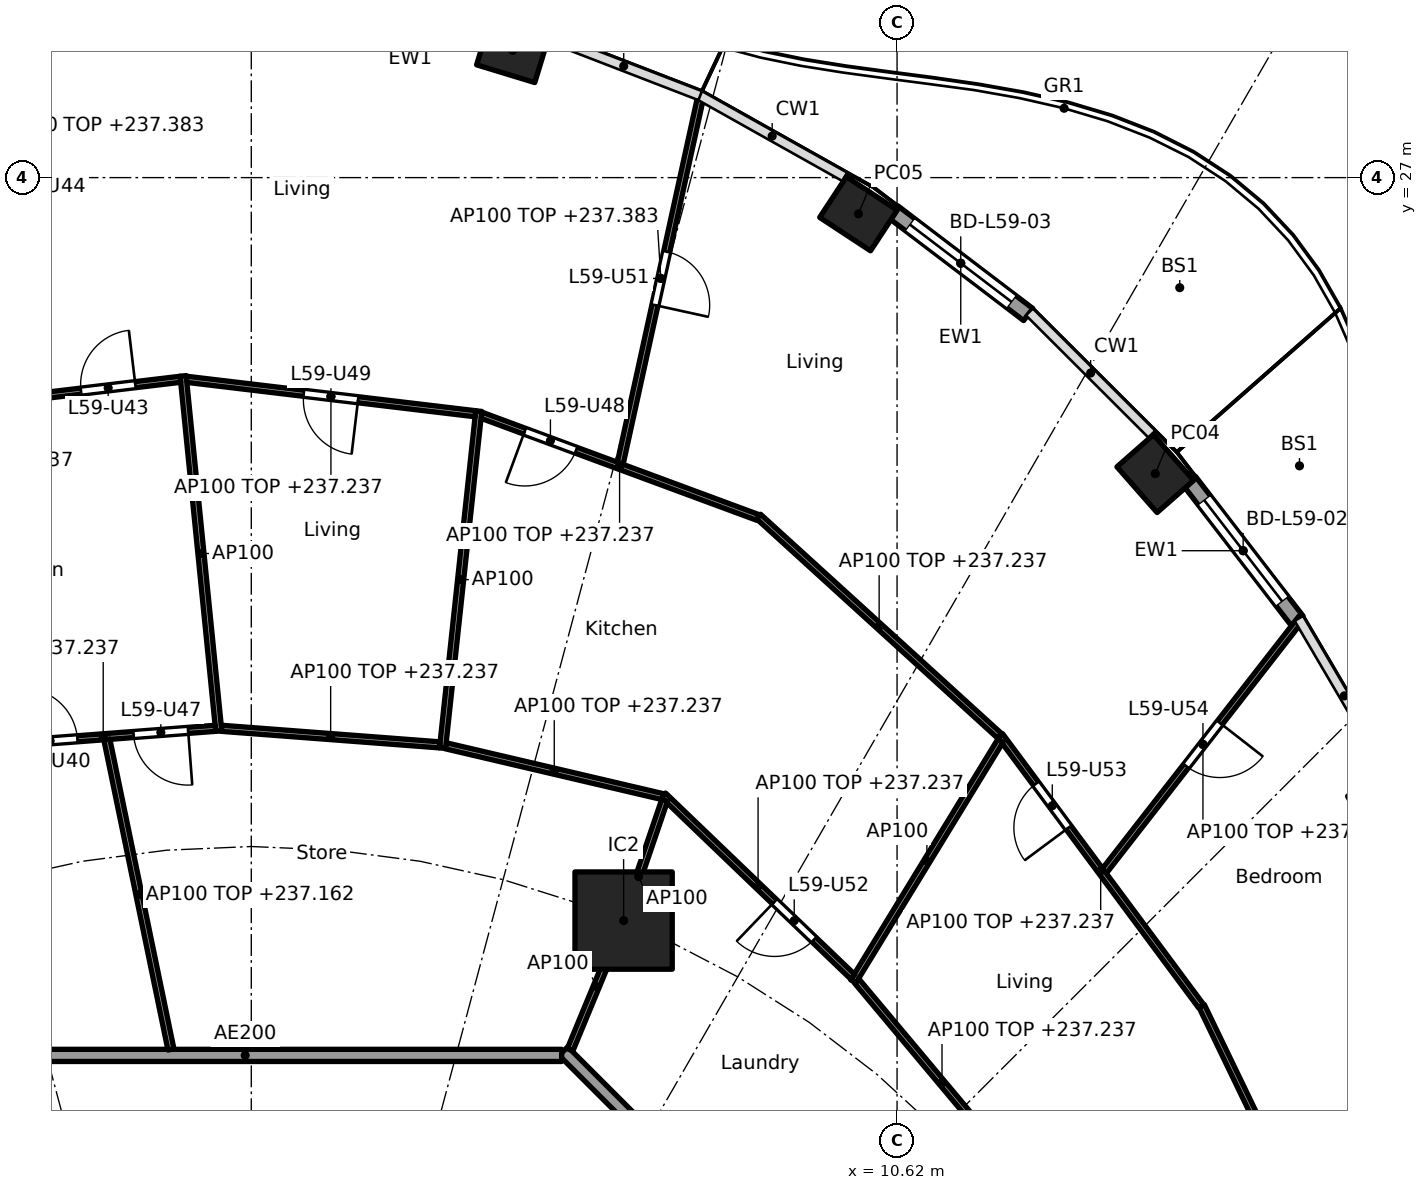
"""IFC4 building model, lengths in metres.
Left out: names, types, materials, properties, quantities, classifications, styles, units other than length and angle.
Written with IfcOpenShell. Run it as: python <this file> out.ifc"""

import sys

from ifc_helpers import new_model, si_unit, direction, frame, frame_2d, origin, origin_2d, place, context, subcontext, project, spatial, rectangle, hollow_rectangle, extrude, element, fill, save


model = new_model("IFC4")
c1 = context("Model", 3, precision=1e-05, world=origin(), true_north=direction((0.0, 1.0)))
c2 = subcontext(c1, "Body", "Model", "MODEL_VIEW")
j1 = project(units=[si_unit("LENGTHUNIT", "METRE"), si_unit("PLANEANGLEUNIT", "RADIAN")], contexts=[c1])
p1 = place(None, origin())
s1 = spatial("IfcSite", under=j1, at=p1, CompositionType="ELEMENT")
p2 = place(p1, origin())
s2 = spatial("IfcBuilding", under=s1, at=p2, CompositionType="ELEMENT")
p3 = place(p2, frame((0.0, 0.0, 234.4)))
s3 = spatial("IfcBuildingStorey", under=s2, at=p3, CompositionType="ELEMENT", Elevation=234.4)
for number, where, z_axis, x_axis in (
    (1, (18.612, 16.563, 0.0), (0.0, 0.0, 1.0), (-0.452, 0.892, 0.0)),
    (2, (14.866, 22.132, 0.0), (0.0, 0.0, 1.0), (-0.66, 0.751, 0.0)),
    (3, (9.985, 26.405, 0.0), (0.0, 0.0, 1.0), (-0.836, 0.549, 0.0)),
    (4, (4.3, 29.092, 0.0), (0.0, 0.0, 1.0), (-0.957, 0.292, 0.0)),
):
    element("IfcColumn", number, at=place(p3, frame(where, z_axis=z_axis, x_axis=x_axis)), inside=s3, PredefinedType="COLUMN", context=c2, shape_type="SweptSolid", body=[
        extrude(hollow_rectangle(XDim=1.0, YDim=0.8, WallThickness=0.032, at=origin_2d()), origin(), (0.0, 0.0, 1.0), 3.7),
    ])
p4 = place(p3, frame((6.123, 14.782, 0.0), z_axis=(0.0, 0.0, 1.0), x_axis=(1.0, 0.0, 0.0)))
e5 = element("IfcColumn", 5, at=p4, inside=s3, PredefinedType="COLUMN", context=c2, shape_type="SweptSolid", body=[
    extrude(rectangle(XDim=1.6, YDim=1.6, at=origin_2d()), origin(), (0.0, 0.0, 1.0), 3.7),
])
p5 = place(p3, frame((15.426, 22.013, 0.0), z_axis=(0.0, 0.0, 1.0), x_axis=(0.610438565676, -0.792063607001, 0.0)))
e6 = element("IfcWall", 6, at=p5, inside=s3, PredefinedType="SOLIDWALL", context=c2, shape_type="SweptSolid", body=[
    extrude(rectangle(XDim=2.901, YDim=0.25, at=frame_2d((1.45, 0.0))), origin(), (0.0, 0.0, 1.0), 3.44),
])
p6 = place(p5, frame((0.4, 0.0, 0.0)))
e7 = element("IfcOpeningElement", 7, at=p6, cuts=e6, PredefinedType="OPENING", context=c2, shape_type="SweptSolid", body=[
    extrude(rectangle(XDim=2.1, YDim=2.4, at=frame_2d((1.05, 1.2))), frame((0.0, 0.135, 0.0), z_axis=(0.0, -1.0, 0.0), x_axis=(1.0, 0.0, 0.0)), (0.0, 0.0, 1.0), 0.27),
])
p7 = place(p3, frame((10.557, 26.436, 0.0), z_axis=(0.0, 0.0, 1.0), x_axis=(0.796022158395, -0.605267480825, 0.0)))
e8 = element("IfcWall", 8, at=p7, inside=s3, PredefinedType="SOLIDWALL", context=c2, shape_type="SweptSolid", body=[
    extrude(rectangle(XDim=2.789, YDim=0.25, at=frame_2d((1.395, 0.0))), origin(), (0.0, 0.0, 1.0), 3.44),
])
p8 = place(p7, frame((0.344, 0.0, 0.0)))
e9 = element("IfcOpeningElement", 9, at=p8, cuts=e8, PredefinedType="OPENING", context=c2, shape_type="SweptSolid", body=[
    extrude(rectangle(XDim=2.1, YDim=2.4, at=frame_2d((1.05, 1.2))), frame((0.0, 0.135, 0.0), z_axis=(0.0, -1.0, 0.0), x_axis=(1.0, 0.0, 0.0)), (0.0, 0.0, 1.0), 0.27),
])
p9 = place(p3, frame((12.635, 5.134, 0.0), z_axis=(0.0, 0.0, 1.0), x_axis=(-0.707106781187, 0.707106781187, 0.0)))
e10 = element("IfcWall", 10, at=p9, inside=s3, PredefinedType="PARTITIONING", context=c2, shape_type="SweptSolid", body=[
    extrude(rectangle(XDim=10.609, YDim=0.2, at=frame_2d((5.305, 0.0))), origin(), (0.0, 0.0, 1.0), 3.44),
])
p10 = place(p3, frame((5.104, 12.565, 0.0), z_axis=(0.0, 0.0, 1.0), x_axis=(-1.0, 0.0, 0.0)))
e11 = element("IfcWall", 11, at=p10, inside=s3, PredefinedType="PARTITIONING", context=c2, shape_type="SweptSolid", body=[
    extrude(rectangle(XDim=10.409, YDim=0.2, at=frame_2d((5.205, 0.0))), origin(), (0.0, 0.0, 1.0), 3.44),
])
p11 = place(p3, frame((18.095, 8.269, 0.0), z_axis=(0.0, 0.0, 1.0), x_axis=(-0.434640773561, 0.900603907363, 0.0)))
e12 = element("IfcWall", 12, at=p11, inside=s3, PredefinedType="PARTITIONING", context=c2, shape_type="SweptSolid", body=[
    extrude(rectangle(XDim=5.674, YDim=0.1, at=frame_2d((2.837, 0.0))), origin(), (0.0, 0.0, 1.0), 2.837),
])
p12 = place(p3, frame((12.759, 10.443, 0.0), z_axis=(0.0, 0.0, 1.0), x_axis=(-0.642225196965, 0.766516011825, 0.0)))
e13 = element("IfcWall", 13, at=p12, inside=s3, PredefinedType="PARTITIONING", context=c2, shape_type="SweptSolid", body=[
    extrude(rectangle(XDim=4.361, YDim=0.1, at=frame_2d((2.18, 0.0))), origin(), (0.0, 0.0, 1.0), 2.837),
])
p13 = place(p3, frame((15.621, 13.374, 0.0), z_axis=(0.0, 0.0, 1.0), x_axis=(-0.596165830899, 0.802861321816, 0.0)))
e14 = element("IfcWall", 14, at=p13, inside=s3, PredefinedType="PARTITIONING", context=c2, shape_type="SweptSolid", body=[
    extrude(rectangle(XDim=5.542, YDim=0.1, at=frame_2d((2.771, 0.0))), origin(), (0.0, 0.0, 1.0), 2.837),
])
p14 = place(p13, frame((3.656, 0.0, 0.0)))
e15 = element("IfcOpeningElement", 15, at=p14, cuts=e14, PredefinedType="OPENING", context=c2, shape_type="SweptSolid", body=[
    extrude(rectangle(XDim=0.9, YDim=2.1, at=frame_2d((0.45, 1.05))), frame((0.0, 0.06, 0.0), z_axis=(0.0, -1.0, 0.0), x_axis=(1.0, 0.0, 0.0)), (0.0, 0.0, 1.0), 0.12),
])
p15 = place(p3, frame((14.029, 15.598, 0.0), z_axis=(0.0, 0.0, 1.0), x_axis=(0.614558710688, 0.788871086501, 0.0)))
e16 = element("IfcWall", 16, at=p15, inside=s3, PredefinedType="PARTITIONING", context=c2, shape_type="SweptSolid", body=[
    extrude(rectangle(XDim=5.276, YDim=0.1, at=frame_2d((2.638, 0.0))), origin(), (0.0, 0.0, 1.0), 2.983),
])
p16 = place(p15, frame((2.188, 0.0, 0.0)))
e17 = element("IfcOpeningElement", 17, at=p16, cuts=e16, PredefinedType="OPENING", context=c2, shape_type="SweptSolid", body=[
    extrude(rectangle(XDim=0.9, YDim=2.1, at=frame_2d((0.45, 1.05))), frame((0.0, 0.06, 0.0), z_axis=(0.0, -1.0, 0.0), x_axis=(1.0, 0.0, 0.0)), (0.0, 0.0, 1.0), 0.12),
])
p17 = place(p3, frame((9.9, 13.781, 0.0), z_axis=(0.0, 0.0, 1.0), x_axis=(0.521464905534, 0.853272730313, 0.0)))
e18 = element("IfcWall", 18, at=p17, inside=s3, PredefinedType="PARTITIONING", context=c2, shape_type="SweptSolid", body=[
    extrude(rectangle(XDim=4.641, YDim=0.1, at=frame_2d((2.32, 0.0))), origin(), (0.0, 0.0, 1.0), 3.44),
])
p18 = place(p3, frame((9.89, 13.858, 0.0), z_axis=(0.0, 0.0, 1.0), x_axis=(-0.72167233993, 0.692234811159, 0.0)))
e19 = element("IfcWall", 19, at=p18, inside=s3, PredefinedType="PARTITIONING", context=c2, shape_type="SweptSolid", body=[
    extrude(rectangle(XDim=4.313, YDim=0.1, at=frame_2d((2.156, 0.0))), origin(), (0.0, 0.0, 1.0), 2.837),
])
p19 = place(p18, frame((0.883, 0.0, 0.0)))
e20 = element("IfcOpeningElement", 20, at=p19, cuts=e19, PredefinedType="OPENING", context=c2, shape_type="SweptSolid", body=[
    extrude(rectangle(XDim=0.9, YDim=2.1, at=frame_2d((0.45, 1.05))), frame((0.0, 0.06, 0.0), z_axis=(0.0, -1.0, 0.0), x_axis=(1.0, 0.0, 0.0)), (0.0, 0.0, 1.0), 0.12),
])
p20 = place(p3, frame((12.31, 17.817, 0.0), z_axis=(0.0, 0.0, 1.0), x_axis=(-0.739697052892, 0.672940019573, 0.0)))
e21 = element("IfcWall", 21, at=p20, inside=s3, PredefinedType="PARTITIONING", context=c2, shape_type="SweptSolid", body=[
    extrude(rectangle(XDim=5.365, YDim=0.1, at=frame_2d((2.683, 0.0))), origin(), (0.0, 0.0, 1.0), 2.837),
])
p21 = place(p3, frame((5.243, 12.657, 0.0), z_axis=(0.0, 0.0, 1.0), x_axis=(0.382719158442, 0.923864733477, 0.0)))
e22 = element("IfcWall", 22, at=p21, inside=s3, PredefinedType="PARTITIONING", context=c2, shape_type="SweptSolid", body=[
    extrude(rectangle(XDim=2.25, YDim=0.1, at=frame_2d((1.125, 0.0))), origin(), (0.0, 0.0, 1.0), 3.44),
])
p22 = place(p3, frame((6.139, 14.829, 0.0), z_axis=(0.0, 0.0, 1.0), x_axis=(0.32278593828, 0.946471995385, 0.0)))
e23 = element("IfcWall", 23, at=p22, inside=s3, PredefinedType="PARTITIONING", context=c2, shape_type="SweptSolid", body=[
    extrude(rectangle(XDim=2.042, YDim=0.1, at=frame_2d((1.021, 0.0))), origin(), (0.0, 0.0, 1.0), 3.44),
])
p23 = place(p3, frame((6.766, 16.82, 0.0), z_axis=(0.0, 0.0, 1.0), x_axis=(-0.973612608559, 0.22820711745, 0.0)))
e24 = element("IfcWall", 24, at=p23, inside=s3, PredefinedType="PARTITIONING", context=c2, shape_type="SweptSolid", body=[
    extrude(rectangle(XDim=3.663, YDim=0.1, at=frame_2d((1.832, 0.0))), origin(), (0.0, 0.0, 1.0), 2.837),
])
p24 = place(p3, frame((8.331, 21.411, 0.0), z_axis=(0.0, 0.0, 1.0), x_axis=(-0.937891982431, 0.346927412136, 0.0)))
e25 = element("IfcWall", 25, at=p24, inside=s3, PredefinedType="PARTITIONING", context=c2, shape_type="SweptSolid", body=[
    extrude(rectangle(XDim=4.85, YDim=0.1, at=frame_2d((2.425, 0.0))), origin(), (0.0, 0.0, 1.0), 2.837),
])
p25 = place(p24, frame((3.188, 0.0, 0.0)))
e26 = element("IfcOpeningElement", 26, at=p25, cuts=e25, PredefinedType="OPENING", context=c2, shape_type="SweptSolid", body=[
    extrude(rectangle(XDim=0.9, YDim=2.1, at=frame_2d((0.45, 1.05))), frame((0.0, 0.06, 0.0), z_axis=(0.0, -1.0, 0.0), x_axis=(1.0, 0.0, 0.0)), (0.0, 0.0, 1.0), 0.12),
])
p26 = place(p3, frame((6.067, 22.301, 0.0), z_axis=(0.0, 0.0, 1.0), x_axis=(0.214401821533, 0.976745544614, 0.0)))
e27 = element("IfcWall", 27, at=p26, inside=s3, PredefinedType="PARTITIONING", context=c2, shape_type="SweptSolid", body=[
    extrude(rectangle(XDim=6.228, YDim=0.1, at=frame_2d((3.114, 0.0))), origin(), (0.0, 0.0, 1.0), 2.983),
])
p27 = place(p26, frame((2.664, 0.0, 0.0)))
e28 = element("IfcOpeningElement", 28, at=p27, cuts=e27, PredefinedType="OPENING", context=c2, shape_type="SweptSolid", body=[
    extrude(rectangle(XDim=0.9, YDim=2.1, at=frame_2d((0.45, 1.05))), frame((0.0, 0.06, 0.0), z_axis=(0.0, -1.0, 0.0), x_axis=(1.0, 0.0, 0.0)), (0.0, 0.0, 1.0), 0.12),
])
p28 = place(p3, frame((3.145, 17.618, 0.0), z_axis=(0.0, 0.0, 1.0), x_axis=(0.106820754108, 0.994278294288, 0.0)))
e29 = element("IfcWall", 29, at=p28, inside=s3, PredefinedType="PARTITIONING", context=c2, shape_type="SweptSolid", body=[
    extrude(rectangle(XDim=5.574, YDim=0.1, at=frame_2d((2.787, 0.0))), origin(), (0.0, 0.0, 1.0), 3.44),
])
p29 = place(p3, frame((3.101, 17.671, 0.0), z_axis=(0.0, 0.0, 1.0), x_axis=(-0.997133705575, 0.075659587668, 0.0)))
e30 = element("IfcWall", 30, at=p29, inside=s3, PredefinedType="PARTITIONING", context=c2, shape_type="SweptSolid", body=[
    extrude(rectangle(XDim=3.601, YDim=0.1, at=frame_2d((1.801, 0.0))), origin(), (0.0, 0.0, 1.0), 2.837),
])
p30 = place(p3, frame((3.686, 23.117, 0.0), z_axis=(0.0, 0.0, 1.0), x_axis=(-0.992965872314, 0.11840091393, 0.0)))
e31 = element("IfcWall", 31, at=p30, inside=s3, PredefinedType="PARTITIONING", context=c2, shape_type="SweptSolid", body=[
    extrude(rectangle(XDim=4.786, YDim=0.1, at=frame_2d((2.393, 0.0))), origin(), (0.0, 0.0, 1.0), 2.837),
])
p31 = place(p30, frame((1.943, 0.0, 0.0)))
e32 = element("IfcOpeningElement", 32, at=p31, cuts=e31, PredefinedType="OPENING", context=c2, shape_type="SweptSolid", body=[
    extrude(rectangle(XDim=0.9, YDim=2.1, at=frame_2d((0.45, 1.05))), frame((0.0, 0.06, 0.0), z_axis=(0.0, -1.0, 0.0), x_axis=(1.0, 0.0, 0.0)), (0.0, 0.0, 1.0), 0.12),
])
p32 = place(p3, frame((-0.535, 17.898, 0.0), z_axis=(0.0, 0.0, 1.0), x_axis=(-0.099853714131, 0.995002128527, 0.0)))
e33 = element("IfcWall", 33, at=p32, inside=s3, PredefinedType="PARTITIONING", context=c2, shape_type="SweptSolid", body=[
    extrude(rectangle(XDim=5.87, YDim=0.1, at=frame_2d((2.935, 0.0))), origin(), (0.0, 0.0, 1.0), 3.44),
])
p33 = place(p3, frame((-0.59, 17.944, 0.0), z_axis=(0.0, 0.0, 1.0), x_axis=(-0.997133495787, -0.075662352452, 0.0)))
e34 = element("IfcWall", 34, at=p33, inside=s3, PredefinedType="PARTITIONING", context=c2, shape_type="SweptSolid", body=[
    extrude(rectangle(XDim=3.701, YDim=0.1, at=frame_2d((1.851, 0.0))), origin(), (0.0, 0.0, 1.0), 2.837),
])
p34 = place(p33, frame((2.276, 0.0, 0.0)))
e35 = element("IfcOpeningElement", 35, at=p34, cuts=e34, PredefinedType="OPENING", context=c2, shape_type="SweptSolid", body=[
    extrude(rectangle(XDim=0.9, YDim=2.1, at=frame_2d((0.45, 1.05))), frame((0.0, 0.06, 0.0), z_axis=(0.0, -1.0, 0.0), x_axis=(1.0, 0.0, 0.0)), (0.0, 0.0, 1.0), 0.12),
])
p35 = place(p33, frame((0.45, 0.0, 0.0)))
e36 = element("IfcOpeningElement", 36, at=p35, cuts=e34, PredefinedType="OPENING", context=c2, shape_type="SweptSolid", body=[
    extrude(rectangle(XDim=0.9, YDim=2.1, at=frame_2d((0.45, 1.05))), frame((0.0, 0.06, 0.0), z_axis=(0.0, -1.0, 0.0), x_axis=(1.0, 0.0, 0.0)), (0.0, 0.0, 1.0), 0.12),
])
p36 = place(p3, frame((-1.166, 23.683, 0.0), z_axis=(0.0, 0.0, 1.0), x_axis=(-0.992961712415, -0.118435795593, 0.0)))
e37 = element("IfcWall", 37, at=p36, inside=s3, PredefinedType="PARTITIONING", context=c2, shape_type="SweptSolid", body=[
    extrude(rectangle(XDim=4.885, YDim=0.1, at=frame_2d((2.443, 0.0))), origin(), (0.0, 0.0, 1.0), 2.837),
])
p37 = place(p36, frame((0.746, 0.0, 0.0)))
e38 = element("IfcOpeningElement", 38, at=p37, cuts=e37, PredefinedType="OPENING", context=c2, shape_type="SweptSolid", body=[
    extrude(rectangle(XDim=0.9, YDim=2.1, at=frame_2d((0.45, 1.05))), frame((0.0, 0.06, 0.0), z_axis=(0.0, -1.0, 0.0), x_axis=(1.0, 0.0, 0.0)), (0.0, 0.0, 1.0), 0.12),
])
p38 = place(p3, frame((-1.321, 12.663, 0.0), z_axis=(0.0, 0.0, 1.0), x_axis=(-0.202526486639, 0.979276785291, 0.0)))
e39 = element("IfcWall", 39, at=p38, inside=s3, PredefinedType="PARTITIONING", context=c2, shape_type="SweptSolid", body=[
    extrude(rectangle(XDim=5.204, YDim=0.1, at=frame_2d((2.602, 0.0))), origin(), (0.0, 0.0, 1.0), 2.762),
])
p39 = place(p6, origin())
e40 = element("IfcDoor", 40, at=p39, inside=s3, OperationType="SLIDING_TO_LEFT", PredefinedType="DOOR", context=c2, shape_type="SweptSolid", body=[
    extrude(rectangle(XDim=2.1, YDim=2.4, at=frame_2d((1.05, 1.2))), frame((0.0, 0.025, 0.0), z_axis=(0.0, -1.0, 0.0), x_axis=(1.0, 0.0, 0.0)), (0.0, 0.0, 1.0), 0.05),
])
fill(e7, e40)
p40 = place(p8, origin())
e41 = element("IfcDoor", 41, at=p40, inside=s3, OperationType="SLIDING_TO_LEFT", PredefinedType="DOOR", context=c2, shape_type="SweptSolid", body=[
    extrude(rectangle(XDim=2.1, YDim=2.4, at=frame_2d((1.05, 1.2))), frame((0.0, 0.025, 0.0), z_axis=(0.0, -1.0, 0.0), x_axis=(1.0, 0.0, 0.0)), (0.0, 0.0, 1.0), 0.05),
])
fill(e9, e41)
p41 = place(p34, frame((0.9, 0.0, 0.0), x_axis=(-1.0, 0.0, 0.0)))
e42 = element("IfcDoor", 42, at=p41, inside=s3, OperationType="SINGLE_SWING_LEFT", PredefinedType="DOOR", context=c2, shape_type="SweptSolid", body=[
    extrude(rectangle(XDim=0.9, YDim=2.1, at=frame_2d((0.45, 1.05))), frame((0.0, 0.025, 0.0), z_axis=(0.0, -1.0, 0.0), x_axis=(1.0, 0.0, 0.0)), (0.0, 0.0, 1.0), 0.05),
])
fill(e35, e42)
p42 = place(p37, frame((0.9, 0.0, 0.0), x_axis=(-1.0, 0.0, 0.0)))
e43 = element("IfcDoor", 43, at=p42, inside=s3, OperationType="SINGLE_SWING_RIGHT", PredefinedType="DOOR", context=c2, shape_type="SweptSolid", body=[
    extrude(rectangle(XDim=0.9, YDim=2.1, at=frame_2d((0.45, 1.05))), frame((0.0, 0.025, 0.0), z_axis=(0.0, -1.0, 0.0), x_axis=(1.0, 0.0, 0.0)), (0.0, 0.0, 1.0), 0.05),
])
fill(e38, e43)
p43 = place(p35, origin())
e44 = element("IfcDoor", 44, at=p43, inside=s3, OperationType="SINGLE_SWING_LEFT", PredefinedType="DOOR", context=c2, shape_type="SweptSolid", body=[
    extrude(rectangle(XDim=0.9, YDim=2.1, at=frame_2d((0.45, 1.05))), frame((0.0, 0.025, 0.0), z_axis=(0.0, -1.0, 0.0), x_axis=(1.0, 0.0, 0.0)), (0.0, 0.0, 1.0), 0.05),
])
fill(e36, e44)
p44 = place(p25, origin())
e45 = element("IfcDoor", 45, at=p44, inside=s3, OperationType="SINGLE_SWING_RIGHT", PredefinedType="DOOR", context=c2, shape_type="SweptSolid", body=[
    extrude(rectangle(XDim=0.9, YDim=2.1, at=frame_2d((0.45, 1.05))), frame((0.0, 0.025, 0.0), z_axis=(0.0, -1.0, 0.0), x_axis=(1.0, 0.0, 0.0)), (0.0, 0.0, 1.0), 0.05),
])
fill(e26, e45)
p45 = place(p31, origin())
e46 = element("IfcDoor", 46, at=p45, inside=s3, OperationType="SINGLE_SWING_LEFT", PredefinedType="DOOR", context=c2, shape_type="SweptSolid", body=[
    extrude(rectangle(XDim=0.9, YDim=2.1, at=frame_2d((0.45, 1.05))), frame((0.0, 0.025, 0.0), z_axis=(0.0, -1.0, 0.0), x_axis=(1.0, 0.0, 0.0)), (0.0, 0.0, 1.0), 0.05),
])
fill(e32, e46)
p46 = place(p27, frame((0.9, 0.0, 0.0), x_axis=(-1.0, 0.0, 0.0)))
e47 = element("IfcDoor", 47, at=p46, inside=s3, OperationType="SINGLE_SWING_RIGHT", PredefinedType="DOOR", context=c2, shape_type="SweptSolid", body=[
    extrude(rectangle(XDim=0.9, YDim=2.1, at=frame_2d((0.45, 1.05))), frame((0.0, 0.025, 0.0), z_axis=(0.0, -1.0, 0.0), x_axis=(1.0, 0.0, 0.0)), (0.0, 0.0, 1.0), 0.05),
])
fill(e28, e47)
p47 = place(p19, origin())
e48 = element("IfcDoor", 48, at=p47, inside=s3, OperationType="SINGLE_SWING_RIGHT", PredefinedType="DOOR", context=c2, shape_type="SweptSolid", body=[
    extrude(rectangle(XDim=0.9, YDim=2.1, at=frame_2d((0.45, 1.05))), frame((0.0, 0.025, 0.0), z_axis=(0.0, -1.0, 0.0), x_axis=(1.0, 0.0, 0.0)), (0.0, 0.0, 1.0), 0.05),
])
fill(e20, e48)
p48 = place(p14, origin())
e49 = element("IfcDoor", 49, at=p48, inside=s3, OperationType="SINGLE_SWING_LEFT", PredefinedType="DOOR", context=c2, shape_type="SweptSolid", body=[
    extrude(rectangle(XDim=0.9, YDim=2.1, at=frame_2d((0.45, 1.05))), frame((0.0, 0.025, 0.0), z_axis=(0.0, -1.0, 0.0), x_axis=(1.0, 0.0, 0.0)), (0.0, 0.0, 1.0), 0.05),
])
fill(e15, e49)
p49 = place(p16, frame((0.9, 0.0, 0.0), x_axis=(-1.0, 0.0, 0.0)))
e50 = element("IfcDoor", 50, at=p49, inside=s3, OperationType="SINGLE_SWING_LEFT", PredefinedType="DOOR", context=c2, shape_type="SweptSolid", body=[
    extrude(rectangle(XDim=0.9, YDim=2.1, at=frame_2d((0.45, 1.05))), frame((0.0, 0.025, 0.0), z_axis=(0.0, -1.0, 0.0), x_axis=(1.0, 0.0, 0.0)), (0.0, 0.0, 1.0), 0.05),
])
fill(e17, e50)
save(model, sys.argv[1])
